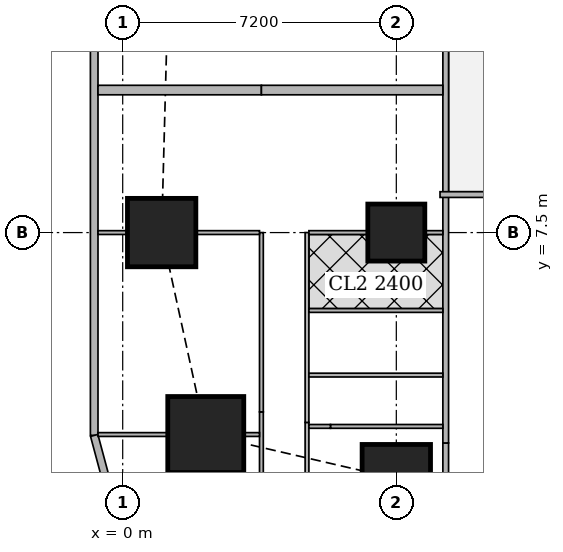
"""IFC4 building model, lengths in metres.
Left out: names, types, materials, properties, quantities, classifications, styles, units other than length and angle.
Written with IfcOpenShell. Run it as: python <this file> out.ifc"""

import sys

from ifc_helpers import new_model, si_unit, direction, frame, frame_2d, origin, origin_2d, place, context, subcontext, project, spatial, rectangle, extrude, element, fill, save


model = new_model("IFC4")
c1 = context("Model", 3, precision=1e-05, world=origin(), true_north=direction((0.0, 1.0)))
c2 = subcontext(c1, "Body", "Model", "MODEL_VIEW")
j1 = project(units=[si_unit("LENGTHUNIT", "METRE"), si_unit("PLANEANGLEUNIT", "RADIAN")], contexts=[c1])
p1 = place(None, origin())
s1 = spatial("IfcSite", under=j1, at=p1, CompositionType="ELEMENT")
p2 = place(p1, origin())
s2 = spatial("IfcBuilding", under=s1, at=p2, CompositionType="ELEMENT")
p3 = place(p2, frame((0.0, 0.0, 139.55)))
s3 = spatial("IfcBuildingStorey", under=s2, at=p3, CompositionType="ELEMENT", Elevation=139.55)
p4 = place(p3, frame((7.2, 1.025, 0.0), z_axis=(0.0, 0.0, 1.0), x_axis=(1.0, 0.0, 0.0)))
e1 = element("IfcColumn", 1, at=p4, inside=s3, PredefinedType="COLUMN", context=c2, shape_type="SweptSolid", body=[
    extrude(rectangle(XDim=1.8, YDim=1.8, at=origin_2d()), origin(), (0.0, 0.0, 1.0), 3.75),
])
p5 = place(p3, frame((2.186, 2.186, 0.0), z_axis=(0.0, 0.0, 1.0), x_axis=(1.0, 0.0, 0.0)))
e2 = element("IfcColumn", 2, at=p5, inside=s3, PredefinedType="COLUMN", context=c2, shape_type="SweptSolid", body=[
    extrude(rectangle(XDim=2.0, YDim=2.0, at=origin_2d()), origin(), (0.0, 0.0, 1.0), 3.75),
])
p6 = place(p3, frame((1.025, 7.5, 0.0), z_axis=(0.0, 0.0, 1.0), x_axis=(1.0, 0.0, 0.0)))
e3 = element("IfcColumn", 3, at=p6, inside=s3, PredefinedType="COLUMN", context=c2, shape_type="SweptSolid", body=[
    extrude(rectangle(XDim=1.8, YDim=1.8, at=origin_2d()), origin(), (0.0, 0.0, 1.0), 3.75),
])
p7 = place(p3, frame((7.2, 7.5, 0.0), z_axis=(0.0, 0.0, 1.0), x_axis=(1.0, 0.0, 0.0)))
e4 = element("IfcColumn", 4, at=p7, inside=s3, PredefinedType="COLUMN", context=c2, shape_type="SweptSolid", body=[
    extrude(rectangle(XDim=1.5, YDim=1.5, at=origin_2d()), origin(), (0.0, 0.0, 1.0), 3.75),
])
p8 = place(p3, frame((-0.75, 42.837, 0.0), z_axis=(0.0, 0.0, 1.0), x_axis=(0.0, -1.0, 0.0)))
e5 = element("IfcWall", 5, at=p8, inside=s3, PredefinedType="SOLIDWALL", context=c2, shape_type="SweptSolid", body=[
    extrude(rectangle(XDim=40.674, YDim=0.2, at=frame_2d((20.337, 0.0))), origin(), (0.0, 0.0, 1.0), 3.5),
])
p9 = place(p8, frame((1.78, 0.0, 0.9)))
e6 = element("IfcOpeningElement", 6, at=p9, cuts=e5, PredefinedType="OPENING", context=c2, shape_type="SweptSolid", body=[
    extrude(rectangle(XDim=1.8, YDim=1.5, at=frame_2d((0.9, 0.75))), frame((0.0, 0.11, 0.0), z_axis=(0.0, -1.0, 0.0), x_axis=(1.0, 0.0, 0.0)), (0.0, 0.0, 1.0), 0.22),
])
p10 = place(p8, frame((6.312, 0.0, 0.9)))
e7 = element("IfcOpeningElement", 7, at=p10, cuts=e5, PredefinedType="OPENING", context=c2, shape_type="SweptSolid", body=[
    extrude(rectangle(XDim=1.8, YDim=1.5, at=frame_2d((0.9, 0.75))), frame((0.0, 0.11, 0.0), z_axis=(0.0, -1.0, 0.0), x_axis=(1.0, 0.0, 0.0)), (0.0, 0.0, 1.0), 0.22),
])
p11 = place(p8, frame((10.062, 0.0, 0.9)))
e8 = element("IfcOpeningElement", 8, at=p11, cuts=e5, PredefinedType="OPENING", context=c2, shape_type="SweptSolid", body=[
    extrude(rectangle(XDim=1.8, YDim=1.5, at=frame_2d((0.9, 0.75))), frame((0.0, 0.11, 0.0), z_axis=(0.0, -1.0, 0.0), x_axis=(1.0, 0.0, 0.0)), (0.0, 0.0, 1.0), 0.22),
])
p12 = place(p8, frame((13.812, 0.0, 0.9)))
e9 = element("IfcOpeningElement", 9, at=p12, cuts=e5, PredefinedType="OPENING", context=c2, shape_type="SweptSolid", body=[
    extrude(rectangle(XDim=1.8, YDim=1.5, at=frame_2d((0.9, 0.75))), frame((0.0, 0.11, 0.0), z_axis=(0.0, -1.0, 0.0), x_axis=(1.0, 0.0, 0.0)), (0.0, 0.0, 1.0), 0.22),
])
p13 = place(p8, frame((17.562, 0.0, 0.9)))
e10 = element("IfcOpeningElement", 10, at=p13, cuts=e5, PredefinedType="OPENING", context=c2, shape_type="SweptSolid", body=[
    extrude(rectangle(XDim=1.8, YDim=1.5, at=frame_2d((0.9, 0.75))), frame((0.0, 0.11, 0.0), z_axis=(0.0, -1.0, 0.0), x_axis=(1.0, 0.0, 0.0)), (0.0, 0.0, 1.0), 0.22),
])
p14 = place(p8, frame((21.312, 0.0, 0.9)))
e11 = element("IfcOpeningElement", 11, at=p14, cuts=e5, PredefinedType="OPENING", context=c2, shape_type="SweptSolid", body=[
    extrude(rectangle(XDim=1.8, YDim=1.5, at=frame_2d((0.9, 0.75))), frame((0.0, 0.11, 0.0), z_axis=(0.0, -1.0, 0.0), x_axis=(1.0, 0.0, 0.0)), (0.0, 0.0, 1.0), 0.22),
])
p15 = place(p8, frame((25.062, 0.0, 0.9)))
e12 = element("IfcOpeningElement", 12, at=p15, cuts=e5, PredefinedType="OPENING", context=c2, shape_type="SweptSolid", body=[
    extrude(rectangle(XDim=1.8, YDim=1.5, at=frame_2d((0.9, 0.75))), frame((0.0, 0.11, 0.0), z_axis=(0.0, -1.0, 0.0), x_axis=(1.0, 0.0, 0.0)), (0.0, 0.0, 1.0), 0.22),
])
p16 = place(p8, frame((28.812, 0.0, 0.9)))
e13 = element("IfcOpeningElement", 13, at=p16, cuts=e5, PredefinedType="OPENING", context=c2, shape_type="SweptSolid", body=[
    extrude(rectangle(XDim=1.8, YDim=1.5, at=frame_2d((0.9, 0.75))), frame((0.0, 0.11, 0.0), z_axis=(0.0, -1.0, 0.0), x_axis=(1.0, 0.0, 0.0)), (0.0, 0.0, 1.0), 0.22),
])
p17 = place(p8, frame((32.562, 0.0, 0.9)))
e14 = element("IfcOpeningElement", 14, at=p17, cuts=e5, PredefinedType="OPENING", context=c2, shape_type="SweptSolid", body=[
    extrude(rectangle(XDim=1.8, YDim=1.5, at=frame_2d((0.9, 0.75))), frame((0.0, 0.11, 0.0), z_axis=(0.0, -1.0, 0.0), x_axis=(1.0, 0.0, 0.0)), (0.0, 0.0, 1.0), 0.22),
])
p18 = place(p8, frame((37.094, 0.0, 0.9)))
e15 = element("IfcOpeningElement", 15, at=p18, cuts=e5, PredefinedType="OPENING", context=c2, shape_type="SweptSolid", body=[
    extrude(rectangle(XDim=1.8, YDim=1.5, at=frame_2d((0.9, 0.75))), frame((0.0, 0.11, 0.0), z_axis=(0.0, -1.0, 0.0), x_axis=(1.0, 0.0, 0.0)), (0.0, 0.0, 1.0), 0.22),
])
p19 = place(p3, frame((-0.75, 2.163, 0.0), z_axis=(0.0, 0.0, 1.0), x_axis=(0.259168954497, -0.965832000415, 0.0)))
e16 = element("IfcWall", 16, at=p19, inside=s3, PredefinedType="SOLIDWALL", context=c2, shape_type="SweptSolid", body=[
    extrude(rectangle(XDim=1.513, YDim=0.2, at=frame_2d((0.756, 0.0))), origin(), (0.0, 0.0, 1.0), 3.5),
])
p20 = place(p3, frame((8.5, 0.159, 0.0), z_axis=(0.0, 0.0, 1.0), x_axis=(0.0, 1.0, 0.0)))
e17 = element("IfcWall", 17, at=p20, inside=s3, PredefinedType="SOLIDWALL", context=c2, shape_type="SweptSolid", body=[
    extrude(rectangle(XDim=1.805, YDim=0.15, at=frame_2d((0.903, 0.0))), origin(), (0.0, 0.0, 1.0), 2.1),
])
p21 = place(p3, frame((8.5, 1.964, 0.0), z_axis=(0.0, 0.0, 1.0), x_axis=(0.0, 1.0, 0.0)))
e18 = element("IfcWall", 18, at=p21, inside=s3, PredefinedType="SOLIDWALL", context=c2, shape_type="SweptSolid", body=[
    extrude(rectangle(XDim=41.097, YDim=0.15, at=frame_2d((20.548, 0.0))), origin(), (0.0, 0.0, 1.0), 3.5),
])
p22 = place(p21, frame((6.911, 0.0, 0.0)))
e19 = element("IfcOpeningElement", 19, at=p22, cuts=e18, PredefinedType="OPENING", context=c2, shape_type="SweptSolid", body=[
    extrude(rectangle(XDim=1.0, YDim=2.1, at=frame_2d((0.5, 1.05))), frame((0.0, 0.085, 0.0), z_axis=(0.0, -1.0, 0.0), x_axis=(1.0, 0.0, 0.0)), (0.0, 0.0, 1.0), 0.17),
])
p23 = place(p21, frame((10.661, 0.0, 0.0)))
e20 = element("IfcOpeningElement", 20, at=p23, cuts=e18, PredefinedType="OPENING", context=c2, shape_type="SweptSolid", body=[
    extrude(rectangle(XDim=1.0, YDim=2.1, at=frame_2d((0.5, 1.05))), frame((0.0, 0.085, 0.0), z_axis=(0.0, -1.0, 0.0), x_axis=(1.0, 0.0, 0.0)), (0.0, 0.0, 1.0), 0.17),
])
p24 = place(p21, frame((25.661, 0.0, 0.0)))
e21 = element("IfcOpeningElement", 21, at=p24, cuts=e18, PredefinedType="OPENING", context=c2, shape_type="SweptSolid", body=[
    extrude(rectangle(XDim=1.0, YDim=2.1, at=frame_2d((0.5, 1.05))), frame((0.0, 0.085, 0.0), z_axis=(0.0, -1.0, 0.0), x_axis=(1.0, 0.0, 0.0)), (0.0, 0.0, 1.0), 0.17),
])
p25 = place(p21, frame((33.161, 0.0, 0.0)))
e22 = element("IfcOpeningElement", 22, at=p25, cuts=e18, PredefinedType="OPENING", context=c2, shape_type="SweptSolid", body=[
    extrude(rectangle(XDim=1.0, YDim=2.1, at=frame_2d((0.5, 1.05))), frame((0.0, 0.085, 0.0), z_axis=(0.0, -1.0, 0.0), x_axis=(1.0, 0.0, 0.0)), (0.0, 0.0, 1.0), 0.17),
])
p26 = place(p3, frame((40.053, 8.5, 0.0), z_axis=(0.0, 0.0, 1.0), x_axis=(-1.0, 0.0, 0.0)))
e23 = element("IfcWall", 23, at=p26, inside=s3, PredefinedType="SOLIDWALL", context=c2, shape_type="SweptSolid", body=[
    extrude(rectangle(XDim=31.703, YDim=0.15, at=frame_2d((15.852, 0.0))), origin(), (0.0, 0.0, 1.0), 3.5),
])
p27 = place(p26, frame((28.103, 0.0, 0.0)))
e24 = element("IfcOpeningElement", 24, at=p27, cuts=e23, PredefinedType="OPENING", context=c2, shape_type="SweptSolid", body=[
    extrude(rectangle(XDim=1.0, YDim=2.1, at=frame_2d((0.5, 1.05))), frame((0.0, 0.085, 0.0), z_axis=(0.0, -1.0, 0.0), x_axis=(1.0, 0.0, 0.0)), (0.0, 0.0, 1.0), 0.17),
])
p28 = place(p26, frame((19.853, 0.0, 0.0)))
e25 = element("IfcOpeningElement", 25, at=p28, cuts=e23, PredefinedType="OPENING", context=c2, shape_type="SweptSolid", body=[
    extrude(rectangle(XDim=1.0, YDim=2.1, at=frame_2d((0.5, 1.05))), frame((0.0, 0.085, 0.0), z_axis=(0.0, -1.0, 0.0), x_axis=(1.0, 0.0, 0.0)), (0.0, 0.0, 1.0), 0.17),
])
p29 = place(p26, frame((5.514, 0.0, 0.0)))
e26 = element("IfcOpeningElement", 26, at=p29, cuts=e23, PredefinedType="OPENING", context=c2, shape_type="SweptSolid", body=[
    extrude(rectangle(XDim=1.0, YDim=2.1, at=frame_2d((0.5, 1.05))), frame((0.0, 0.085, 0.0), z_axis=(0.0, -1.0, 0.0), x_axis=(1.0, 0.0, 0.0)), (0.0, 0.0, 1.0), 0.17),
])
p30 = place(p3, frame((3.65, 0.912, 0.0), z_axis=(0.0, 0.0, 1.0), x_axis=(0.0, 1.0, 0.0)))
e27 = element("IfcWall", 27, at=p30, inside=s3, PredefinedType="PARTITIONING", context=c2, shape_type="SweptSolid", body=[
    extrude(rectangle(XDim=1.87, YDim=0.1, at=frame_2d((0.935, 0.0))), origin(), (0.0, 0.0, 1.0), 2.1),
])
p31 = place(p3, frame((3.65, 2.782, 0.0), z_axis=(0.0, 0.0, 1.0), x_axis=(0.0, 1.0, 0.0)))
e28 = element("IfcWall", 28, at=p31, inside=s3, PredefinedType="PARTITIONING", context=c2, shape_type="SweptSolid", body=[
    extrude(rectangle(XDim=4.718, YDim=0.1, at=frame_2d((2.359, 0.0))), origin(), (0.0, 0.0, 1.0), 3.5),
])
p32 = place(p31, frame((3.618, 0.0, 0.0)))
e29 = element("IfcOpeningElement", 29, at=p32, cuts=e28, PredefinedType="OPENING", context=c2, shape_type="SweptSolid", body=[
    extrude(rectangle(XDim=0.9, YDim=2.1, at=frame_2d((0.45, 1.05))), frame((0.0, 0.06, 0.0), z_axis=(0.0, -1.0, 0.0), x_axis=(1.0, 0.0, 0.0)), (0.0, 0.0, 1.0), 0.12),
])
p33 = place(p3, frame((4.85, 0.634, 0.0), z_axis=(0.0, 0.0, 1.0), x_axis=(0.0, 1.0, 0.0)))
e30 = element("IfcWall", 30, at=p33, inside=s3, PredefinedType="PARTITIONING", context=c2, shape_type="SweptSolid", body=[
    extrude(rectangle(XDim=1.871, YDim=0.1, at=frame_2d((0.936, 0.0))), origin(), (0.0, 0.0, 1.0), 2.1),
])
p34 = place(p3, frame((4.85, 2.505, 0.0), z_axis=(0.0, 0.0, 1.0), x_axis=(0.0, 1.0, 0.0)))
e31 = element("IfcWall", 31, at=p34, inside=s3, PredefinedType="PARTITIONING", context=c2, shape_type="SweptSolid", body=[
    extrude(rectangle(XDim=4.995, YDim=0.1, at=frame_2d((2.498, 0.0))), origin(), (0.0, 0.0, 1.0), 3.5),
])
p35 = place(p34, frame((3.52, 0.0, 0.0)))
e32 = element("IfcOpeningElement", 32, at=p35, cuts=e31, PredefinedType="OPENING", context=c2, shape_type="SweptSolid", body=[
    extrude(rectangle(XDim=0.9, YDim=2.1, at=frame_2d((0.45, 1.05))), frame((0.0, 0.06, 0.0), z_axis=(0.0, -1.0, 0.0), x_axis=(1.0, 0.0, 0.0)), (0.0, 0.0, 1.0), 0.12),
])
p36 = place(p34, frame((1.645, 0.0, 0.0)))
e33 = element("IfcOpeningElement", 33, at=p36, cuts=e31, PredefinedType="OPENING", context=c2, shape_type="SweptSolid", body=[
    extrude(rectangle(XDim=0.9, YDim=2.1, at=frame_2d((0.45, 1.05))), frame((0.0, 0.06, 0.0), z_axis=(0.0, -1.0, 0.0), x_axis=(1.0, 0.0, 0.0)), (0.0, 0.0, 1.0), 0.12),
])
p37 = place(p3, frame((-0.65, 2.186, 0.0), z_axis=(0.0, 0.0, 1.0), x_axis=(1.0, 0.0, 0.0)))
e34 = element("IfcWall", 34, at=p37, inside=s3, PredefinedType="PARTITIONING", context=c2, shape_type="SweptSolid", body=[
    extrude(rectangle(XDim=1.835, YDim=0.1, at=frame_2d((0.917, 0.0))), origin(), (0.0, 0.0, 1.0), 3.5),
])
p38 = place(p3, frame((3.187, 2.186, 0.0), z_axis=(0.0, 0.0, 1.0), x_axis=(1.0, 0.0, 0.0)))
e35 = element("IfcWall", 35, at=p38, inside=s3, PredefinedType="PARTITIONING", context=c2, shape_type="SweptSolid", body=[
    extrude(rectangle(XDim=0.413, YDim=0.1, at=frame_2d((0.207, 0.0))), origin(), (0.0, 0.0, 1.0), 2.1),
])
p39 = place(p3, frame((-0.65, 7.5, 0.0), z_axis=(0.0, 0.0, 1.0), x_axis=(1.0, 0.0, 0.0)))
e36 = element("IfcWall", 36, at=p39, inside=s3, PredefinedType="PARTITIONING", context=c2, shape_type="SweptSolid", body=[
    extrude(rectangle(XDim=0.774, YDim=0.1, at=frame_2d((0.387, 0.0))), origin(), (0.0, 0.0, 1.0), 3.5),
])
p40 = place(p3, frame((1.926, 7.5, 0.0), z_axis=(0.0, 0.0, 1.0), x_axis=(1.0, 0.0, 0.0)))
e37 = element("IfcWall", 37, at=p40, inside=s3, PredefinedType="PARTITIONING", context=c2, shape_type="SweptSolid", body=[
    extrude(rectangle(XDim=1.674, YDim=0.1, at=frame_2d((0.837, 0.0))), origin(), (0.0, 0.0, 1.0), 2.1),
])
p41 = place(p3, frame((4.9, 3.75, 0.0), z_axis=(0.0, 0.0, 1.0), x_axis=(1.0, 0.0, 0.0)))
e38 = element("IfcWall", 38, at=p41, inside=s3, PredefinedType="PARTITIONING", context=c2, shape_type="SweptSolid", body=[
    extrude(rectangle(XDim=3.525, YDim=0.1, at=frame_2d((1.763, 0.0))), origin(), (0.0, 0.0, 1.0), 3.5),
])
p42 = place(p3, frame((4.9, 7.5, 0.0), z_axis=(0.0, 0.0, 1.0), x_axis=(1.0, 0.0, 0.0)))
e39 = element("IfcWall", 39, at=p42, inside=s3, PredefinedType="PARTITIONING", context=c2, shape_type="SweptSolid", body=[
    extrude(rectangle(XDim=1.549, YDim=0.1, at=frame_2d((0.774, 0.0))), origin(), (0.0, 0.0, 1.0), 3.5),
])
p43 = place(p3, frame((7.951, 7.5, 0.0), z_axis=(0.0, 0.0, 1.0), x_axis=(1.0, 0.0, 0.0)))
e40 = element("IfcWall", 40, at=p43, inside=s3, PredefinedType="PARTITIONING", context=c2, shape_type="SweptSolid", body=[
    extrude(rectangle(XDim=0.474, YDim=0.1, at=frame_2d((0.237, 0.0))), origin(), (0.0, 0.0, 1.0), 3.5),
])
p44 = place(p3, frame((4.9, 5.45, 0.0), z_axis=(0.0, 0.0, 1.0), x_axis=(1.0, 0.0, 0.0)))
e41 = element("IfcWall", 41, at=p44, inside=s3, PredefinedType="PARTITIONING", context=c2, shape_type="SweptSolid", body=[
    extrude(rectangle(XDim=3.525, YDim=0.1, at=frame_2d((1.763, 0.0))), origin(), (0.0, 0.0, 1.0), 3.5),
])
p45 = place(p3, frame((-0.65, 11.25, 0.0), z_axis=(0.0, 0.0, 1.0), x_axis=(1.0, 0.0, 0.0)))
e42 = element("IfcWall", 42, at=p45, inside=s3, PredefinedType="SOLIDWALL", context=c2, shape_type="SweptSolid", body=[
    extrude(rectangle(XDim=4.3, YDim=0.25, at=frame_2d((2.15, 0.0))), origin(), (0.0, 0.0, 1.0), 2.1),
])
p46 = place(p3, frame((3.65, 11.25, 0.0), z_axis=(0.0, 0.0, 1.0), x_axis=(1.0, 0.0, 0.0)))
e43 = element("IfcWall", 43, at=p46, inside=s3, PredefinedType="SOLIDWALL", context=c2, shape_type="SweptSolid", body=[
    extrude(rectangle(XDim=4.775, YDim=0.25, at=frame_2d((2.388, 0.0))), origin(), (0.0, 0.0, 1.0), 3.5),
])
p47 = place(p3, frame((5.467, 2.4, 0.0), z_axis=(0.0, 0.0, 1.0), x_axis=(1.0, 0.0, 0.0)))
e44 = element("IfcWall", 44, at=p47, inside=s3, PredefinedType="PARTITIONING", context=c2, shape_type="SweptSolid", body=[
    extrude(rectangle(XDim=2.958, YDim=0.1, at=frame_2d((1.479, 0.0))), origin(), (0.0, 0.0, 1.0), 3.5),
])
p48 = place(p47, frame((0.108, 0.0, 0.0)))
e45 = element("IfcOpeningElement", 45, at=p48, cuts=e44, PredefinedType="OPENING", context=c2, shape_type="SweptSolid", body=[
    extrude(rectangle(XDim=0.9, YDim=2.1, at=frame_2d((0.45, 1.05))), frame((0.0, 0.06, 0.0), z_axis=(0.0, -1.0, 0.0), x_axis=(1.0, 0.0, 0.0)), (0.0, 0.0, 1.0), 0.12),
])
p49 = place(p3, frame((5.467, 2.4, 0.0), z_axis=(0.0, 0.0, 1.0), x_axis=(-1.0, 0.0, 0.0)))
e46 = element("IfcWall", 46, at=p49, inside=s3, PredefinedType="PARTITIONING", context=c2, shape_type="SweptSolid", body=[
    extrude(rectangle(XDim=0.567, YDim=0.1, at=frame_2d((0.284, 0.0))), origin(), (0.0, 0.0, 1.0), 2.1),
])
p50 = place(p16, origin())
e47 = element("IfcWindow", 47, at=p50, inside=s3, PartitioningType="SINGLE_PANEL", PredefinedType="WINDOW", context=c2, shape_type="SweptSolid", body=[
    extrude(rectangle(XDim=1.8, YDim=1.5, at=frame_2d((0.9, 0.75))), frame((0.0, 0.03, 0.0), z_axis=(0.0, -1.0, 0.0), x_axis=(1.0, 0.0, 0.0)), (0.0, 0.0, 1.0), 0.06),
])
fill(e13, e47)
p51 = place(p17, origin())
e48 = element("IfcWindow", 48, at=p51, inside=s3, PartitioningType="SINGLE_PANEL", PredefinedType="WINDOW", context=c2, shape_type="SweptSolid", body=[
    extrude(rectangle(XDim=1.8, YDim=1.5, at=frame_2d((0.9, 0.75))), frame((0.0, 0.03, 0.0), z_axis=(0.0, -1.0, 0.0), x_axis=(1.0, 0.0, 0.0)), (0.0, 0.0, 1.0), 0.06),
])
fill(e14, e48)
p52 = place(p18, origin())
e49 = element("IfcWindow", 49, at=p52, inside=s3, PartitioningType="SINGLE_PANEL", PredefinedType="WINDOW", context=c2, shape_type="SweptSolid", body=[
    extrude(rectangle(XDim=1.8, YDim=1.5, at=frame_2d((0.9, 0.75))), frame((0.0, 0.03, 0.0), z_axis=(0.0, -1.0, 0.0), x_axis=(1.0, 0.0, 0.0)), (0.0, 0.0, 1.0), 0.06),
])
fill(e15, e49)
p53 = place(p32, origin())
e50 = element("IfcDoor", 50, at=p53, inside=s3, OperationType="SINGLE_SWING_RIGHT", PredefinedType="DOOR", context=c2, shape_type="SweptSolid", body=[
    extrude(rectangle(XDim=0.9, YDim=2.1, at=frame_2d((0.45, 1.05))), frame((0.0, 0.025, 0.0), z_axis=(0.0, -1.0, 0.0), x_axis=(1.0, 0.0, 0.0)), (0.0, 0.0, 1.0), 0.05),
])
fill(e29, e50)
p54 = place(p35, origin())
e51 = element("IfcDoor", 51, at=p54, inside=s3, OperationType="SINGLE_SWING_LEFT", PredefinedType="DOOR", context=c2, shape_type="SweptSolid", body=[
    extrude(rectangle(XDim=0.9, YDim=2.1, at=frame_2d((0.45, 1.05))), frame((0.0, 0.025, 0.0), z_axis=(0.0, -1.0, 0.0), x_axis=(1.0, 0.0, 0.0)), (0.0, 0.0, 1.0), 0.05),
])
fill(e32, e51)
p55 = place(p36, origin())
e52 = element("IfcDoor", 52, at=p55, inside=s3, OperationType="SINGLE_SWING_LEFT", PredefinedType="DOOR", context=c2, shape_type="SweptSolid", body=[
    extrude(rectangle(XDim=0.9, YDim=2.1, at=frame_2d((0.45, 1.05))), frame((0.0, 0.025, 0.0), z_axis=(0.0, -1.0, 0.0), x_axis=(1.0, 0.0, 0.0)), (0.0, 0.0, 1.0), 0.05),
])
fill(e33, e52)
p56 = place(p22, origin())
e53 = element("IfcDoor", 53, at=p56, inside=s3, OperationType="SINGLE_SWING_LEFT", PredefinedType="DOOR", context=c2, shape_type="SweptSolid", body=[
    extrude(rectangle(XDim=1.0, YDim=2.1, at=frame_2d((0.5, 1.05))), frame((0.0, 0.025, 0.0), z_axis=(0.0, -1.0, 0.0), x_axis=(1.0, 0.0, 0.0)), (0.0, 0.0, 1.0), 0.05),
])
fill(e19, e53)
p57 = place(p48, origin())
e54 = element("IfcDoor", 54, at=p57, inside=s3, OperationType="SINGLE_SWING_LEFT", PredefinedType="DOOR", context=c2, shape_type="SweptSolid", body=[
    extrude(rectangle(XDim=0.9, YDim=2.1, at=frame_2d((0.45, 1.05))), frame((0.0, 0.025, 0.0), z_axis=(0.0, -1.0, 0.0), x_axis=(1.0, 0.0, 0.0)), (0.0, 0.0, 1.0), 0.05),
])
fill(e45, e54)
save(model, sys.argv[1])
